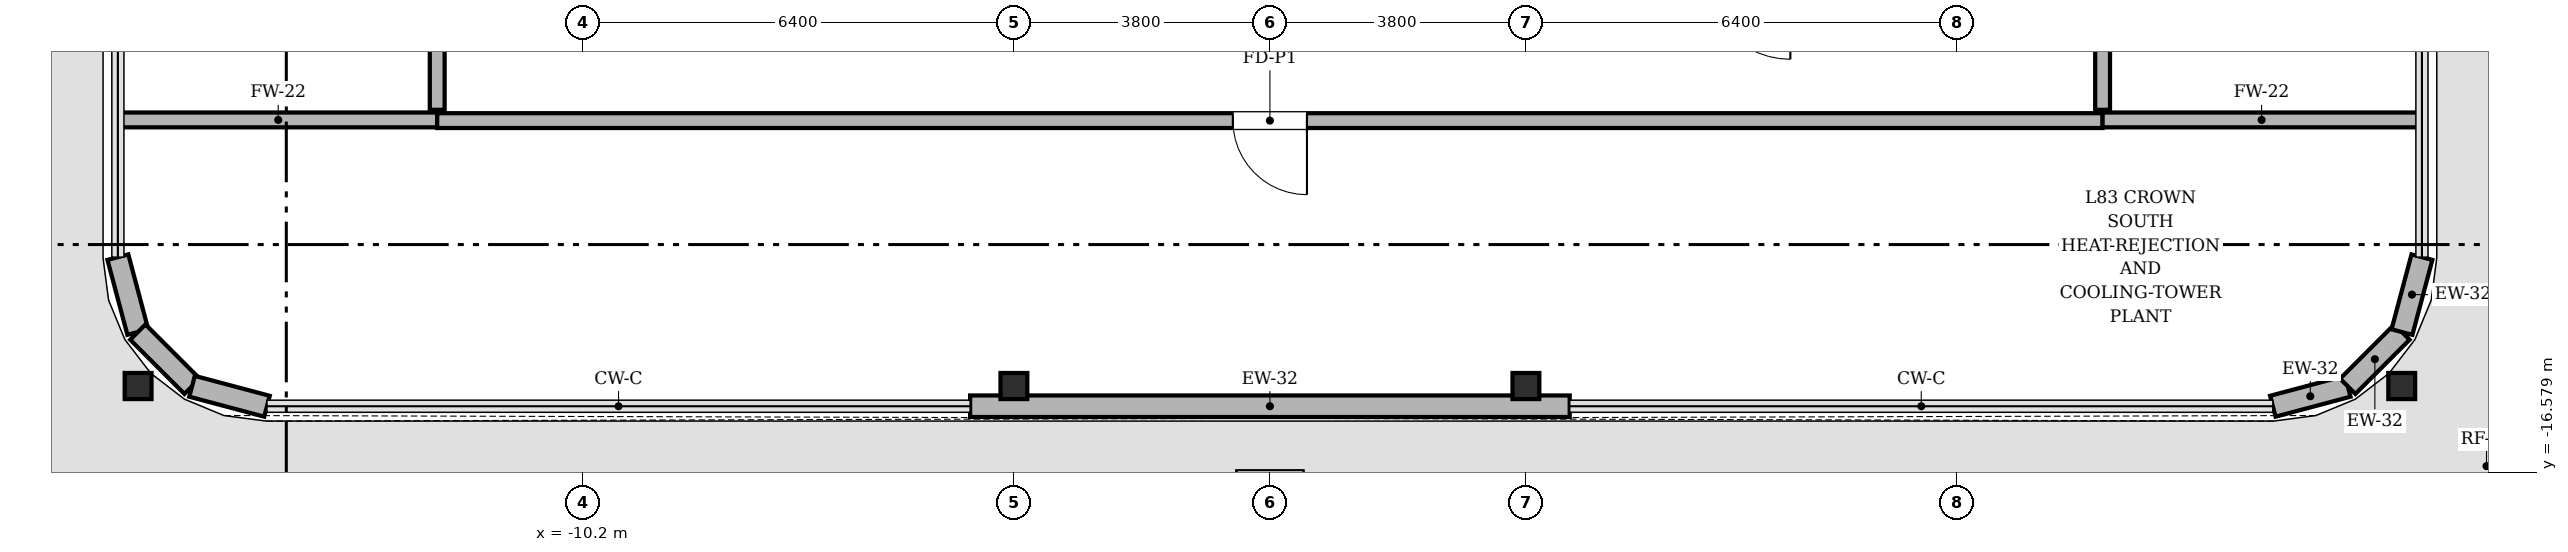
"""IFC4 building model, lengths in metres.
Left out: names, types, materials, properties, quantities, classifications, styles, units other than length and angle.
Written with IfcOpenShell. Run it as: python <this file> out.ifc"""

import sys

from ifc_helpers import new_model, si_unit, direction, frame, frame_2d, origin, origin_2d, place, context, subcontext, project, spatial, rectangle, i_section, extrude, element, fill, save


model = new_model("IFC4")
c1 = context("Model", 3, precision=1e-05, world=origin(), true_north=direction((0.0, 1.0)))
c2 = subcontext(c1, "Body", "Model", "MODEL_VIEW")
j1 = project(units=[si_unit("LENGTHUNIT", "METRE"), si_unit("PLANEANGLEUNIT", "RADIAN")], contexts=[c1])
p1 = place(None, origin())
s1 = spatial("IfcSite", under=j1, at=p1, CompositionType="ELEMENT")
p2 = place(p1, origin())
s2 = spatial("IfcBuilding", under=s1, at=p2, CompositionType="ELEMENT")
p3 = place(p2, frame((0.0, 0.0, 352.8)))
s3 = spatial("IfcBuildingStorey", under=s2, at=p3, CompositionType="ELEMENT", Elevation=352.8)
for number, where, z_axis, x_axis in (
    (1, (-3.8, -15.3, 0.0), (0.0, 0.0, 1.0), (1.0, 0.0, 0.0)),
    (2, (3.8, -15.3, 0.0), (0.0, 0.0, 1.0), (1.0, 0.0, 0.0)),
    (3, (-16.8, -15.3, 0.0), (0.0, 0.0, 1.0), (1.0, 0.0, 0.0)),
    (4, (16.8, -15.3, 0.0), (0.0, 0.0, 1.0), (1.0, 0.0, 0.0)),
):
    element("IfcColumn", number, at=place(p3, frame(where, z_axis=z_axis, x_axis=x_axis)), inside=s3, PredefinedType="COLUMN", context=c2, shape_type="SweptSolid", body=[
        extrude(i_section(OverallWidth=0.398, OverallDepth=0.387, WebThickness=0.021, FlangeThickness=0.033, FilletRadius=0.018, at=origin_2d()), origin(), (0.0, 0.0, 1.0), 4.498),
    ])
p4 = place(p3, frame((-4.45, -15.6, 0.0), z_axis=(0.0, 0.0, 1.0), x_axis=(1.0, 0.0, 0.0)))
e5 = element("IfcWall", 5, at=p4, inside=s3, PredefinedType="SOLIDWALL", context=c2, shape_type="SweptSolid", body=[
    extrude(rectangle(XDim=8.9, YDim=0.32, at=frame_2d((4.45, 0.0))), origin(), (0.0, 0.0, 1.0), 2.994),
])
p5 = place(p3, frame((14.887, -15.6, 0.0), z_axis=(0.0, 0.0, 1.0), x_axis=(0.966270139534, 0.257530614576, 0.0)))
e6 = element("IfcWall", 6, at=p5, inside=s3, PredefinedType="SOLIDWALL", context=c2, shape_type="SweptSolid", body=[
    extrude(rectangle(XDim=1.151, YDim=0.32, at=frame_2d((0.575, 0.0))), origin(), (0.0, 0.0, 1.0), 2.994),
])
p6 = place(p3, frame((15.999, -15.304, 0.0), z_axis=(0.0, 0.0, 1.0), x_axis=(0.707106781187, 0.707106781187, 0.0)))
e7 = element("IfcWall", 7, at=p6, inside=s3, PredefinedType="SOLIDWALL", context=c2, shape_type="SweptSolid", body=[
    extrude(rectangle(XDim=1.138, YDim=0.32, at=frame_2d((0.569, 0.0))), origin(), (0.0, 0.0, 1.0), 2.994),
])
for number, where, z_axis, x_axis in (
    (8, (16.804, -14.499, 0.0), (0.0, 0.0, 1.0), (0.258, 0.966, 0.0)),
    (9, (-17.1, -13.387, 0.0), (0.0, 0.0, 1.0), (0.258, -0.966, 0.0)),
):
    element("IfcWall", number, at=place(p3, frame(where, z_axis=z_axis, x_axis=x_axis)), inside=s3, PredefinedType="SOLIDWALL", context=c2, shape_type="SweptSolid", body=[
        extrude(rectangle(XDim=1.151, YDim=0.32, at=frame_2d((0.575, 0.0))), origin(), (0.0, 0.0, 1.0), 2.994),
    ])
p7 = place(p3, frame((-16.804, -14.499, 0.0), z_axis=(0.0, 0.0, 1.0), x_axis=(0.707106781187, -0.707106781187, 0.0)))
e10 = element("IfcWall", 10, at=p7, inside=s3, PredefinedType="SOLIDWALL", context=c2, shape_type="SweptSolid", body=[
    extrude(rectangle(XDim=1.138, YDim=0.32, at=frame_2d((0.569, 0.0))), origin(), (0.0, 0.0, 1.0), 2.994),
])
p8 = place(p3, frame((-15.999, -15.304, 0.0), z_axis=(0.0, 0.0, 1.0), x_axis=(0.966270139534, -0.257530614576, 0.0)))
e11 = element("IfcWall", 11, at=p8, inside=s3, PredefinedType="SOLIDWALL", context=c2, shape_type="SweptSolid", body=[
    extrude(rectangle(XDim=1.151, YDim=0.32, at=frame_2d((0.575, 0.0))), origin(), (0.0, 0.0, 1.0), 2.994),
])
p9 = place(p3, frame((-17.08, -11.35, 0.0), z_axis=(0.0, 0.0, 1.0), x_axis=(1.0, 0.0, 0.0)))
e12 = element("IfcWall", 12, at=p9, inside=s3, PredefinedType="SOLIDWALL", context=c2, shape_type="SweptSolid", body=[
    extrude(rectangle(XDim=4.72, YDim=0.22, at=frame_2d((2.36, 0.0))), origin(), (0.0, 0.0, 1.0), 2.994),
])
p10 = place(p3, frame((-12.36, -11.36, 0.0), z_axis=(0.0, 0.0, 1.0), x_axis=(1.0, 0.0, 0.0)))
e13 = element("IfcWall", 13, at=p10, inside=s3, PredefinedType="SOLIDWALL", context=c2, shape_type="SweptSolid", body=[
    extrude(rectangle(XDim=24.72, YDim=0.22, at=frame_2d((12.36, 0.0))), origin(), (0.0, 0.0, 1.0), 2.994),
])
p11 = place(p10, frame((11.81, 0.0, 0.0)))
e14 = element("IfcOpeningElement", 14, at=p11, cuts=e13, PredefinedType="OPENING", context=c2, shape_type="SweptSolid", body=[
    extrude(rectangle(XDim=1.1, YDim=2.2, at=frame_2d((0.55, 1.1))), frame((0.0, 0.12, 0.0), z_axis=(0.0, -1.0, 0.0), x_axis=(1.0, 0.0, 0.0)), (0.0, 0.0, 1.0), 0.24),
])
p12 = place(p3, frame((12.36, -11.35, 0.0), z_axis=(0.0, 0.0, 1.0), x_axis=(1.0, 0.0, 0.0)))
e15 = element("IfcWall", 15, at=p12, inside=s3, PredefinedType="SOLIDWALL", context=c2, shape_type="SweptSolid", body=[
    extrude(rectangle(XDim=4.72, YDim=0.22, at=frame_2d((2.36, 0.0))), origin(), (0.0, 0.0, 1.0), 2.994),
])
p13 = place(p3, frame((-12.36, 11.2, 0.0), z_axis=(0.0, 0.0, 1.0), x_axis=(0.0, -1.0, 0.0)))
e16 = element("IfcWall", 16, at=p13, inside=s3, PredefinedType="SOLIDWALL", context=c2, shape_type="SweptSolid", body=[
    extrude(rectangle(XDim=22.4, YDim=0.22, at=frame_2d((11.2, 0.0))), origin(), (0.0, 0.0, 1.0), 2.994),
])
p14 = place(p13, frame((10.65, 0.0, 0.0)))
e17 = element("IfcOpeningElement", 17, at=p14, cuts=e16, PredefinedType="OPENING", context=c2, shape_type="SweptSolid", body=[
    extrude(rectangle(XDim=1.1, YDim=2.2, at=frame_2d((0.55, 1.1))), frame((0.0, 0.12, 0.0), z_axis=(0.0, -1.0, 0.0), x_axis=(1.0, 0.0, 0.0)), (0.0, 0.0, 1.0), 0.24),
])
p15 = place(p3, frame((12.36, -11.2, 0.0), z_axis=(0.0, 0.0, 1.0), x_axis=(0.0, 1.0, 0.0)))
e18 = element("IfcWall", 18, at=p15, inside=s3, PredefinedType="SOLIDWALL", context=c2, shape_type="SweptSolid", body=[
    extrude(rectangle(XDim=22.4, YDim=0.22, at=frame_2d((11.2, 0.0))), origin(), (0.0, 0.0, 1.0), 2.994),
])
p16 = place(p15, frame((10.65, 0.0, 0.0)))
e19 = element("IfcOpeningElement", 19, at=p16, cuts=e18, PredefinedType="OPENING", context=c2, shape_type="SweptSolid", body=[
    extrude(rectangle(XDim=1.1, YDim=2.2, at=frame_2d((0.55, 1.1))), frame((0.0, 0.12, 0.0), z_axis=(0.0, -1.0, 0.0), x_axis=(1.0, 0.0, 0.0)), (0.0, 0.0, 1.0), 0.24),
])
p17 = place(p3, frame((0.0, 0.0, -0.25)))
p18 = place(p17, frame((0.0, -17.15, 0.0)))
p19 = place(p18, frame((0.0, 0.0, 0.25)))
e20 = element("IfcDoor", 20, at=p19, inside=s3, OperationType="SINGLE_SWING_LEFT", PredefinedType="TRAPDOOR", context=c2, shape_type="SweptSolid", body=[
    extrude(rectangle(XDim=1.0, YDim=1.2, at=origin_2d()), origin(), (0.0, 0.0, 1.0), 0.05),
])
p20 = place(p11, origin())
e21 = element("IfcDoor", 21, at=p20, inside=s3, OperationType="SINGLE_SWING_RIGHT", PredefinedType="DOOR", context=c2, shape_type="SweptSolid", body=[
    extrude(rectangle(XDim=1.1, YDim=2.2, at=frame_2d((0.55, 1.1))), frame((0.0, 0.025, 0.0), z_axis=(0.0, -1.0, 0.0), x_axis=(1.0, 0.0, 0.0)), (0.0, 0.0, 1.0), 0.05),
])
fill(e14, e21)
save(model, sys.argv[1])
